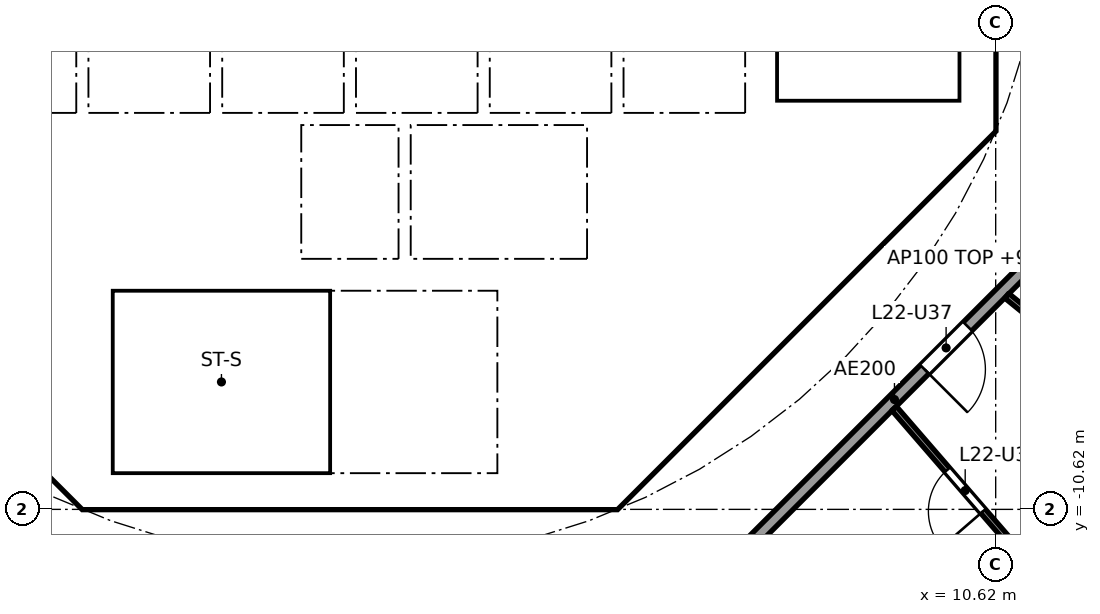
"""IFC4 building model, lengths in metres.
Left out: names, types, materials, properties, quantities, classifications, styles, units other than length and angle.
Written with IfcOpenShell. Run it as: python <this file> out.ifc"""

import sys

from ifc_helpers import new_model, si_unit, direction, frame, frame_2d, origin, place, context, subcontext, project, spatial, polyline, rectangle, outline, extrude, element, fill, save


model = new_model("IFC4")
c1 = context("Model", 3, precision=1e-05, world=origin(), true_north=direction((0.0, 1.0)))
c2 = subcontext(c1, "Body", "Model", "MODEL_VIEW")
j1 = project(units=[si_unit("LENGTHUNIT", "METRE"), si_unit("PLANEANGLEUNIT", "RADIAN")], contexts=[c1])
p1 = place(None, origin())
s1 = spatial("IfcSite", under=j1, at=p1, CompositionType="ELEMENT")
p2 = place(p1, origin())
s2 = spatial("IfcBuilding", under=s1, at=p2, CompositionType="ELEMENT")
p3 = place(p2, frame((0.0, 0.0, 91.8)))
s3 = spatial("IfcBuildingStorey", under=s2, at=p3, CompositionType="ELEMENT", Elevation=91.8)
p4 = place(p3, frame((-9.988, -4.613, 0.0), z_axis=(0.0, 0.0, 1.0), x_axis=(0.707106781187, -0.707106781187, 0.0)))
e1 = element("IfcWall", 1, at=p4, inside=s3, PredefinedType="SHEAR", context=c2, shape_type="SweptSolid", body=[
    extrude(rectangle(XDim=7.602, YDim=0.6, at=frame_2d((3.801, 0.0))), origin(), (0.0, 0.0, 1.0), 3.44),
])
p5 = place(p4, frame((6.151, 0.0, 0.0)))
e2 = element("IfcOpeningElement", 2, at=p5, cuts=e1, PredefinedType="OPENING", context=c2, shape_type="SweptSolid", body=[
    extrude(rectangle(XDim=1.1, YDim=2.1, at=frame_2d((0.55, 1.05))), frame((0.0, 0.31, 0.0), z_axis=(0.0, -1.0, 0.0), x_axis=(1.0, 0.0, 0.0)), (0.0, 0.0, 1.0), 0.62),
])
p6 = place(p3, frame((4.613, -9.988, 0.0), z_axis=(0.0, 0.0, 1.0), x_axis=(0.707106781187, 0.707106781187, 0.0)))
e3 = element("IfcWall", 3, at=p6, inside=s3, PredefinedType="SHEAR", context=c2, shape_type="SweptSolid", body=[
    extrude(rectangle(XDim=7.602, YDim=0.6, at=frame_2d((3.801, 0.0))), origin(), (0.0, 0.0, 1.0), 3.44),
])
p7 = place(p6, frame((3.201, 0.0, 0.0)))
e4 = element("IfcOpeningElement", 4, at=p7, cuts=e3, PredefinedType="OPENING", context=c2, shape_type="SweptSolid", body=[
    extrude(rectangle(XDim=1.2, YDim=2.1, at=frame_2d((0.6, 1.05))), frame((0.0, 0.31, 0.0), z_axis=(0.0, -1.0, 0.0), x_axis=(1.0, 0.0, 0.0)), (0.0, 0.0, 1.0), 0.62),
])
p8 = place(p3, frame((4.0, -10.025, 0.0), z_axis=(0.0, 0.0, 1.0), x_axis=(0.0, 1.0, 0.0)))
e5 = element("IfcWall", 5, at=p8, inside=s3, PredefinedType="SOLIDWALL", context=c2, shape_type="SweptSolid", body=[
    extrude(rectangle(XDim=3.0, YDim=0.2, at=frame_2d((1.5, 0.0))), origin(), (0.0, 0.0, 1.0), 3.44),
])
p9 = place(p8, frame((0.975, 0.0, 0.0)))
e6 = element("IfcOpeningElement", 6, at=p9, cuts=e5, PredefinedType="OPENING", context=c2, shape_type="SweptSolid", body=[
    extrude(rectangle(XDim=1.1, YDim=2.1, at=frame_2d((0.55, 1.05))), frame((0.0, 0.11, 0.0), z_axis=(0.0, -1.0, 0.0), x_axis=(1.0, 0.0, 0.0)), (0.0, 0.0, 1.0), 0.22),
])
p10 = place(p3, frame((4.0, -6.5, 0.0), z_axis=(0.0, 0.0, 1.0), x_axis=(0.0, 1.0, 0.0)))
e7 = element("IfcWall", 7, at=p10, inside=s3, PredefinedType="SOLIDWALL", context=c2, shape_type="SweptSolid", body=[
    extrude(rectangle(XDim=2.2, YDim=0.2, at=frame_2d((1.1, 0.0))), origin(), (0.0, 0.0, 1.0), 3.44),
])
p11 = place(p10, frame((0.55, 0.0, 0.0)))
e8 = element("IfcOpeningElement", 8, at=p11, cuts=e7, PredefinedType="OPENING", context=c2, shape_type="SweptSolid", body=[
    extrude(rectangle(XDim=1.1, YDim=2.1, at=frame_2d((0.55, 1.05))), frame((0.0, 0.11, 0.0), z_axis=(0.0, -1.0, 0.0), x_axis=(1.0, 0.0, 0.0)), (0.0, 0.0, 1.0), 0.22),
])
p12 = place(p3, frame((-4.0, -6.5, 0.0), z_axis=(0.0, 0.0, 1.0), x_axis=(0.0, 1.0, 0.0)))
e9 = element("IfcWall", 9, at=p12, inside=s3, PredefinedType="SOLIDWALL", context=c2, shape_type="SweptSolid", body=[
    extrude(rectangle(XDim=2.2, YDim=0.2, at=frame_2d((1.1, 0.0))), origin(), (0.0, 0.0, 1.0), 3.44),
])
p13 = place(p12, frame((0.65, 0.0, 0.0)))
e10 = element("IfcOpeningElement", 10, at=p13, cuts=e9, PredefinedType="OPENING", context=c2, shape_type="SweptSolid", body=[
    extrude(rectangle(XDim=0.9, YDim=2.1, at=frame_2d((0.45, 1.05))), frame((0.0, 0.11, 0.0), z_axis=(0.0, -1.0, 0.0), x_axis=(1.0, 0.0, 0.0)), (0.0, 0.0, 1.0), 0.22),
])
p14 = place(p3, origin())
e11 = element("IfcWall", 11, at=p14, inside=s3, PredefinedType="SHEAR", context=c2, shape_type="SweptSolid", body=[
    extrude(outline(polyline([(-4.152, -10.025), (4.152, -10.025), (4.401, -9.776), (4.825, -10.2), (4.401, -10.625), (-4.401, -10.625), (-4.825, -10.2), (-4.401, -9.776), (-4.152, -10.025)])), origin(), (0.0, 0.0, 1.0), 3.44),
])
p15 = place(p3, origin())
e12 = element("IfcWall", 12, at=p15, inside=s3, PredefinedType="SHEAR", context=c2, shape_type="SweptSolid", body=[
    extrude(outline(polyline([(9.776, -4.401), (10.025, -4.152), (10.025, -3.801), (10.025, 4.152), (9.776, 4.401), (10.2, 4.825), (10.625, 4.401), (10.625, -4.401), (10.2, -4.825), (9.776, -4.401)])), origin(), (0.0, 0.0, 1.0), 3.44),
])
for number, where, z_axis, x_axis in (
    (13, (-0.9, -6.5, 0.0), (0.0, 0.0, 1.0), (0.0, 1.0, 0.0)),
    (14, (0.9, -6.5, 0.0), (0.0, 0.0, 1.0), (0.0, 1.0, 0.0)),
):
    element("IfcWall", number, at=place(p3, frame(where, z_axis=z_axis, x_axis=x_axis)), inside=s3, PredefinedType="SOLIDWALL", context=c2, shape_type="SweptSolid", body=[
        extrude(rectangle(XDim=2.2, YDim=0.2, at=frame_2d((1.1, 0.0))), origin(), (0.0, 0.0, 1.0), 3.44),
    ])
p16 = place(p3, origin())
e15 = element("IfcWall", 15, at=p16, inside=s3, PredefinedType="SOLIDWALL", context=c2, shape_type="SweptSolid", body=[
    extrude(outline(polyline([(-6.7, -2.1), (-6.5, -2.1), (-6.5, -4.1), (-4.5, -4.1), (-4.5, -2.1), (-4.3, -2.1), (-4.3, -4.1), (-2.3, -4.1), (-2.3, -2.1), (-2.1, -2.1), (-2.1, -4.1), (-0.1, -4.1), (-0.1, -2.1), (0.1, -2.1), (0.1, -4.1), (2.1, -4.1), (2.1, -2.1), (2.3, -2.1), (2.3, -4.1), (4.3, -4.1), (4.3, -2.1), (4.5, -2.1), (4.5, -4.1), (6.5, -4.1), (6.5, -2.1), (6.7, -2.1), (6.7, -4.3), (-6.7, -4.3), (-6.7, -2.1)])), origin(), (0.0, 0.0, 1.0), 3.44),
])
p17 = place(p3, origin())
e16 = element("IfcWall", 16, at=p17, inside=s3, PredefinedType="SOLIDWALL", context=c2, shape_type="SweptSolid", body=[
    extrude(outline(polyline([(-3.9, -10.025), (-4.1, -10.025), (-4.1, -7.025), (-3.9, -7.025), (-3.9, -10.025)])), origin(), (0.0, 0.0, 1.0), 3.44),
])
p18 = place(p3, origin())
e17 = element("IfcWall", 17, at=p18, inside=s3, PredefinedType="SOLIDWALL", context=c2, shape_type="SweptSolid", body=[
    extrude(outline(polyline([(4.1, -7.025), (-4.1, -7.025), (-4.1, -6.5), (4.1, -6.5), (4.1, -7.025)])), origin(), (0.0, 0.0, 1.0), 3.44),
])
p19 = place(p3, origin())
e18 = element("IfcWall", 18, at=p19, inside=s3, PredefinedType="SOLIDWALL", context=c2, shape_type="SweptSolid", body=[
    extrude(outline(polyline([(7.025, -3.9), (6.7, -3.9), (6.7, 3.9), (7.025, 3.9), (7.025, -3.9)])), origin(), (0.0, 0.0, 1.0), 3.44),
])
p20 = place(p3, origin())
e19 = element("IfcWall", 19, at=p20, inside=s3, PredefinedType="SOLIDWALL", context=c2, shape_type="SweptSolid", body=[
    extrude(outline(polyline([(10.025, -4.1), (6.7, -4.1), (6.7, -3.9), (10.025, -3.9), (10.025, -4.1)])), origin(), (0.0, 0.0, 1.0), 3.44),
])
p21 = place(p3, frame((5.275, -12.494, 0.0), z_axis=(0.0, 0.0, 1.0), x_axis=(0.707106781187, 0.707106781187, 0.0)))
e20 = element("IfcWall", 20, at=p21, inside=s3, PredefinedType="PARTITIONING", context=c2, shape_type="SweptSolid", body=[
    extrude(rectangle(XDim=10.409, YDim=0.2, at=frame_2d((5.205, 0.0))), origin(), (0.0, 0.0, 1.0), 3.44),
])
p22 = place(p21, frame((5.906, 0.0, 0.0)))
e21 = element("IfcOpeningElement", 21, at=p22, cuts=e20, PredefinedType="OPENING", context=c2, shape_type="SweptSolid", body=[
    extrude(rectangle(XDim=1.0, YDim=2.1, at=frame_2d((0.5, 1.05))), frame((0.0, 0.11, 0.0), z_axis=(0.0, -1.0, 0.0), x_axis=(1.0, 0.0, 0.0)), (0.0, 0.0, 1.0), 0.22),
])
p23 = place(p3, frame((8.95, -8.96, 0.0), z_axis=(0.0, 0.0, 1.0), x_axis=(0.65441081073, -0.756139200676, 0.0)))
e22 = element("IfcWall", 22, at=p23, inside=s3, PredefinedType="PARTITIONING", context=c2, shape_type="SweptSolid", body=[
    extrude(rectangle(XDim=12.451, YDim=0.1, at=frame_2d((6.226, 0.0))), origin(), (0.0, 0.0, 1.0), 2.687),
])
p24 = place(p23, frame((1.336, 0.0, 0.0)))
e23 = element("IfcOpeningElement", 23, at=p24, cuts=e22, PredefinedType="OPENING", context=c2, shape_type="SweptSolid", body=[
    extrude(rectangle(XDim=0.9, YDim=2.1, at=frame_2d((0.45, 1.05))), frame((0.0, 0.06, 0.0), z_axis=(0.0, -1.0, 0.0), x_axis=(1.0, 0.0, 0.0)), (0.0, 0.0, 1.0), 0.12),
])
p25 = place(p23, frame((5.501, 0.0, 0.0)))
e24 = element("IfcOpeningElement", 24, at=p25, cuts=e22, PredefinedType="OPENING", context=c2, shape_type="SweptSolid", body=[
    extrude(rectangle(XDim=0.9, YDim=2.1, at=frame_2d((0.45, 1.05))), frame((0.0, 0.06, 0.0), z_axis=(0.0, -1.0, 0.0), x_axis=(1.0, 0.0, 0.0)), (0.0, 0.0, 1.0), 0.12),
])
p26 = place(p23, frame((9.941, 0.0, 0.0)))
e25 = element("IfcOpeningElement", 25, at=p26, cuts=e22, PredefinedType="OPENING", context=c2, shape_type="SweptSolid", body=[
    extrude(rectangle(XDim=0.9, YDim=2.1, at=frame_2d((0.45, 1.05))), frame((0.0, 0.06, 0.0), z_axis=(0.0, -1.0, 0.0), x_axis=(1.0, 0.0, 0.0)), (0.0, 0.0, 1.0), 0.12),
])
p27 = place(p3, frame((10.802, -7.107, 0.0), z_axis=(0.0, 0.0, 1.0), x_axis=(0.776992142502, -0.62951029419, 0.0)))
e26 = element("IfcWall", 26, at=p27, inside=s3, PredefinedType="PARTITIONING", context=c2, shape_type="SweptSolid", body=[
    extrude(rectangle(XDim=3.263, YDim=0.1, at=frame_2d((1.631, 0.0))), origin(), (0.0, 0.0, 1.0), 2.687),
])
p28 = place(p27, frame((1.181, 0.0, 0.0)))
e27 = element("IfcOpeningElement", 27, at=p28, cuts=e26, PredefinedType="OPENING", context=c2, shape_type="SweptSolid", body=[
    extrude(rectangle(XDim=0.9, YDim=2.1, at=frame_2d((0.45, 1.05))), frame((0.0, 0.06, 0.0), z_axis=(0.0, -1.0, 0.0), x_axis=(1.0, 0.0, 0.0)), (0.0, 0.0, 1.0), 0.12),
])
p29 = place(p11, origin())
e28 = element("IfcDoor", 28, at=p29, inside=s3, OperationType="DOUBLE_DOOR_SLIDING", PredefinedType="DOOR", context=c2, shape_type="SweptSolid", body=[
    extrude(rectangle(XDim=1.1, YDim=2.1, at=frame_2d((0.55, 1.05))), frame((0.0, 0.025, 0.0), z_axis=(0.0, -1.0, 0.0), x_axis=(1.0, 0.0, 0.0)), (0.0, 0.0, 1.0), 0.05),
])
fill(e8, e28)
p30 = place(p9, origin())
e29 = element("IfcDoor", 29, at=p30, inside=s3, OperationType="SINGLE_SWING_RIGHT", PredefinedType="DOOR", context=c2, shape_type="SweptSolid", body=[
    extrude(rectangle(XDim=1.1, YDim=2.1, at=frame_2d((0.55, 1.05))), frame((0.0, 0.025, 0.0), z_axis=(0.0, -1.0, 0.0), x_axis=(1.0, 0.0, 0.0)), (0.0, 0.0, 1.0), 0.05),
])
fill(e6, e29)
p31 = place(p13, frame((0.9, 0.0, 0.0), x_axis=(-1.0, 0.0, 0.0)))
e30 = element("IfcDoor", 30, at=p31, inside=s3, OperationType="SINGLE_SWING_LEFT", PredefinedType="DOOR", context=c2, shape_type="SweptSolid", body=[
    extrude(rectangle(XDim=0.9, YDim=2.1, at=frame_2d((0.45, 1.05))), frame((0.0, 0.025, 0.0), z_axis=(0.0, -1.0, 0.0), x_axis=(1.0, 0.0, 0.0)), (0.0, 0.0, 1.0), 0.05),
])
fill(e10, e30)
p32 = place(p7, origin())
e31 = element("IfcDoor", 31, at=p32, inside=s3, OperationType="SINGLE_SWING_RIGHT", PredefinedType="DOOR", context=c2, shape_type="SweptSolid", body=[
    extrude(rectangle(XDim=1.2, YDim=2.1, at=frame_2d((0.6, 1.05))), frame((0.0, 0.025, 0.0), z_axis=(0.0, -1.0, 0.0), x_axis=(1.0, 0.0, 0.0)), (0.0, 0.0, 1.0), 0.05),
])
fill(e4, e31)
p33 = place(p5, origin())
e32 = element("IfcDoor", 32, at=p33, inside=s3, OperationType="SINGLE_SWING_RIGHT", PredefinedType="DOOR", context=c2, shape_type="SweptSolid", body=[
    extrude(rectangle(XDim=1.1, YDim=2.1, at=frame_2d((0.55, 1.05))), frame((0.0, 0.025, 0.0), z_axis=(0.0, -1.0, 0.0), x_axis=(1.0, 0.0, 0.0)), (0.0, 0.0, 1.0), 0.05),
])
fill(e2, e32)
p34 = place(p22, frame((1.0, 0.0, 0.0), x_axis=(-1.0, 0.0, 0.0)))
e33 = element("IfcDoor", 33, at=p34, inside=s3, OperationType="SINGLE_SWING_RIGHT", PredefinedType="DOOR", context=c2, shape_type="SweptSolid", body=[
    extrude(rectangle(XDim=1.0, YDim=2.1, at=frame_2d((0.5, 1.05))), frame((0.0, 0.025, 0.0), z_axis=(0.0, -1.0, 0.0), x_axis=(1.0, 0.0, 0.0)), (0.0, 0.0, 1.0), 0.05),
])
fill(e21, e33)
p35 = place(p24, frame((0.9, 0.0, 0.0), x_axis=(-1.0, 0.0, 0.0)))
e34 = element("IfcDoor", 34, at=p35, inside=s3, OperationType="SINGLE_SWING_LEFT", PredefinedType="DOOR", context=c2, shape_type="SweptSolid", body=[
    extrude(rectangle(XDim=0.9, YDim=2.1, at=frame_2d((0.45, 1.05))), frame((0.0, 0.025, 0.0), z_axis=(0.0, -1.0, 0.0), x_axis=(1.0, 0.0, 0.0)), (0.0, 0.0, 1.0), 0.05),
])
fill(e23, e34)
save(model, sys.argv[1])
